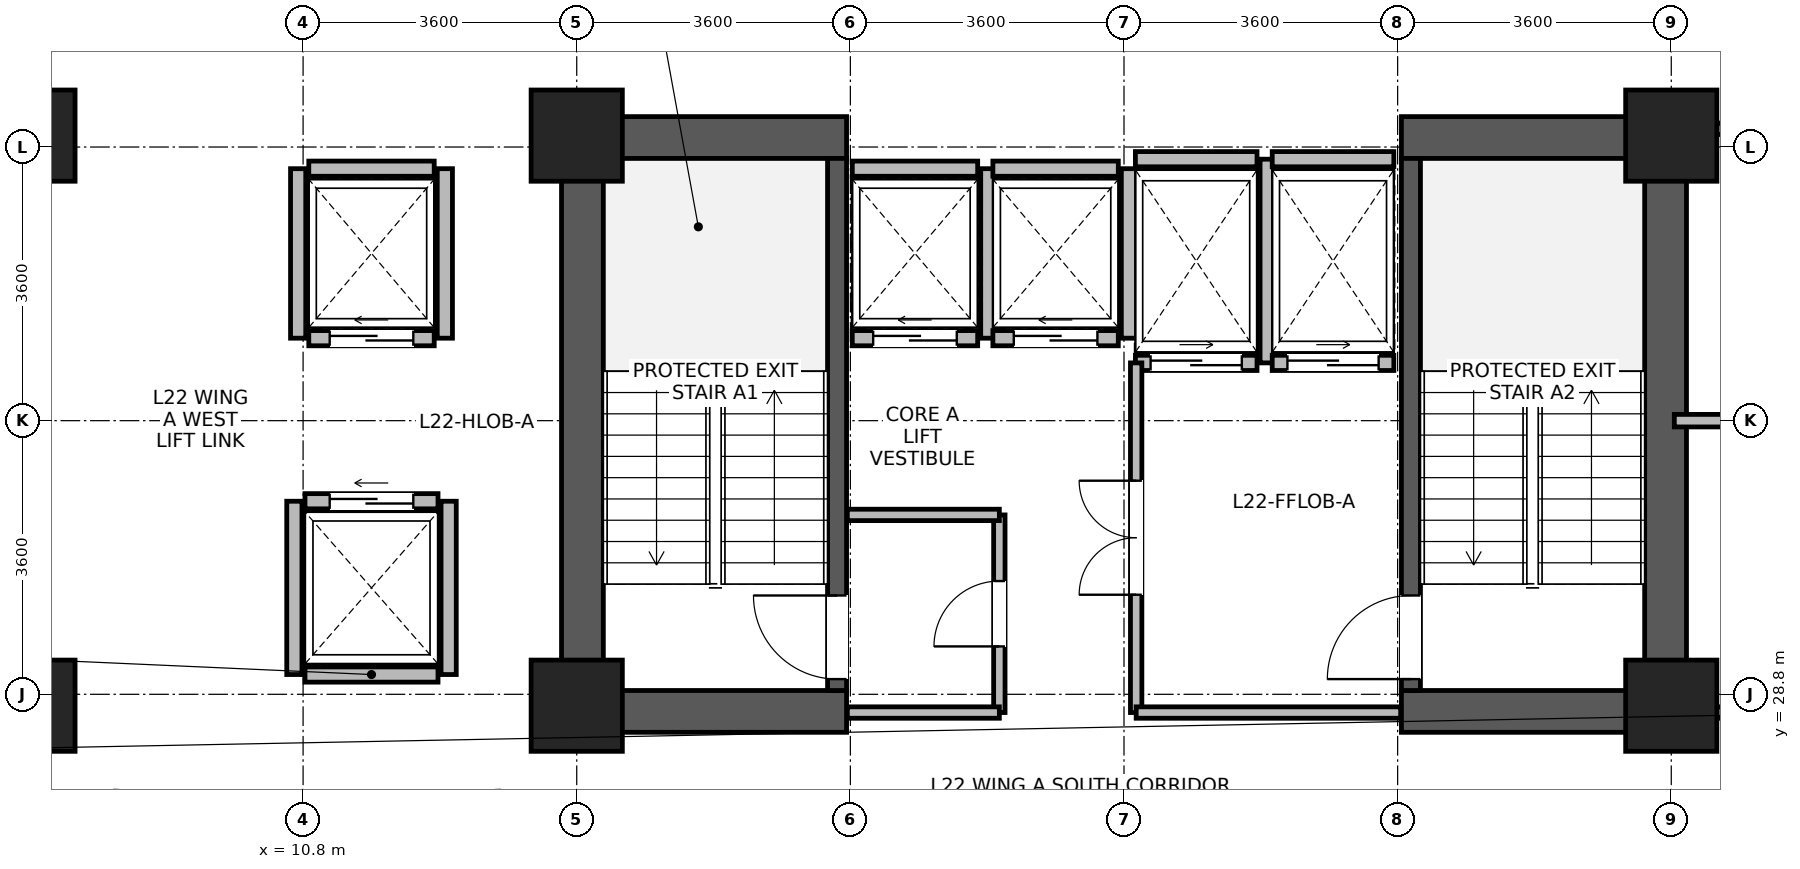
"""IFC4 building model, lengths in metres.
Left out: names, types, materials, properties, quantities, classifications, styles, units other than length and angle.
Written with IfcOpenShell. Run it as: python <this file> out.ifc"""

import sys

from ifc_helpers import new_model, si_unit, direction, frame, frame_2d, origin, origin_2d, place, context, subcontext, project, spatial, rectangle, extrude, source, transform, mapped, element, fill, save


model = new_model("IFC4")
c1 = context("Model", 3, precision=1e-05, world=origin(), true_north=direction((0.0, 1.0)))
c2 = subcontext(c1, "Body", "Model", "MODEL_VIEW")
j1 = project(units=[si_unit("LENGTHUNIT", "METRE"), si_unit("PLANEANGLEUNIT", "RADIAN")], contexts=[c1])
p1 = place(None, origin())
s1 = spatial("IfcSite", under=j1, at=p1, CompositionType="ELEMENT")
p2 = place(p1, origin())
s2 = spatial("IfcBuilding", under=s1, at=p2, CompositionType="ELEMENT")
p3 = place(p2, frame((0.0, 0.0, 89.7)))
s3 = spatial("IfcBuildingStorey", under=s2, at=p3, CompositionType="ELEMENT", Elevation=89.7)
for number, where, z_axis, x_axis in (
    (1, (14.475, 28.3, 0.0), (0.0, 0.0, 1.0), (0.0, 1.0, 0.0)),
    (2, (28.725, 28.3, 0.0), (0.0, 0.0, 1.0), (0.0, 1.0, 0.0)),
):
    element("IfcWall", number, at=place(p3, frame(where, z_axis=z_axis, x_axis=x_axis)), inside=s3, PredefinedType="SHEAR", context=c2, shape_type="SweptSolid", body=[
        extrude(rectangle(XDim=8.1, YDim=0.55, at=frame_2d((4.05, 0.0))), origin(), (0.0, 0.0, 1.0), 3.45),
    ])
for number, where, z_axis, x_axis in (
    (3, (14.75, 28.575, 0.0), (0.0, 0.0, 1.0), (1.0, 0.0, 0.0)),
    (4, (25.25, 28.575, 0.0), (0.0, 0.0, 1.0), (1.0, 0.0, 0.0)),
    (5, (14.75, 36.125, 0.0), (0.0, 0.0, 1.0), (1.0, 0.0, 0.0)),
    (6, (25.25, 36.125, 0.0), (0.0, 0.0, 1.0), (1.0, 0.0, 0.0)),
):
    element("IfcWall", number, at=place(p3, frame(where, z_axis=z_axis, x_axis=x_axis)), inside=s3, PredefinedType="SHEAR", context=c2, shape_type="SweptSolid", body=[
        extrude(rectangle(XDim=3.2, YDim=0.55, at=frame_2d((1.6, 0.0))), origin(), (0.0, 0.0, 1.0), 3.45),
    ])
p4 = place(p3, frame((17.825, 28.85, 0.0), z_axis=(0.0, 0.0, 1.0), x_axis=(0.0, 1.0, 0.0)))
e7 = element("IfcWall", 7, at=p4, inside=s3, PredefinedType="SHEAR", context=c2, shape_type="SweptSolid", body=[
    extrude(rectangle(XDim=7.0, YDim=0.25, at=frame_2d((3.5, 0.0))), origin(), (0.0, 0.0, 1.0), 3.45),
])
p5 = place(p4, frame((0.15, 0.0, 0.0)))
e8 = element("IfcOpeningElement", 8, at=p5, cuts=e7, PredefinedType="OPENING", context=c2, shape_type="SweptSolid", body=[
    extrude(rectangle(XDim=1.1, YDim=2.08, at=frame_2d((0.55, 1.04))), frame((0.0, 0.135, 0.0), z_axis=(0.0, -1.0, 0.0), x_axis=(1.0, 0.0, 0.0)), (0.0, 0.0, 1.0), 0.27),
])
p6 = place(p3, frame((25.375, 28.85, 0.0), z_axis=(0.0, 0.0, 1.0), x_axis=(0.0, 1.0, 0.0)))
e9 = element("IfcWall", 9, at=p6, inside=s3, PredefinedType="SHEAR", context=c2, shape_type="SweptSolid", body=[
    extrude(rectangle(XDim=7.0, YDim=0.25, at=frame_2d((3.5, 0.0))), origin(), (0.0, 0.0, 1.0), 3.45),
])
p7 = place(p6, frame((0.15, 0.0, 0.0)))
e10 = element("IfcOpeningElement", 10, at=p7, cuts=e9, PredefinedType="OPENING", context=c2, shape_type="SweptSolid", body=[
    extrude(rectangle(XDim=1.1, YDim=2.08, at=frame_2d((0.55, 1.04))), frame((0.0, 0.135, 0.0), z_axis=(0.0, -1.0, 0.0), x_axis=(1.0, 0.0, 0.0)), (0.0, 0.0, 1.0), 0.27),
])
m1 = source(origin(), c2, "Body", "SweptSolid", [
    extrude(rectangle(XDim=1.2, YDim=1.2, at=origin_2d()), origin(), (0.0, 0.0, 1.0), 3.7),
])
for number, where, z_axis, x_axis in (
    (11, (7.2, 28.65, 0.0), (0.0, 0.0, 1.0), (1.0, 0.0, 0.0)),
    (12, (7.2, 36.15, 0.0), (0.0, 0.0, 1.0), (1.0, 0.0, 0.0)),
    (13, (14.4, 28.65, 0.0), (0.0, 0.0, 1.0), (1.0, 0.0, 0.0)),
    (14, (14.4, 36.15, 0.0), (0.0, 0.0, 1.0), (1.0, 0.0, 0.0)),
    (15, (28.8, 28.65, 0.0), (0.0, 0.0, 1.0), (1.0, 0.0, 0.0)),
    (16, (28.8, 36.15, 0.0), (0.0, 0.0, 1.0), (1.0, 0.0, 0.0)),
):
    element("IfcColumn", number, at=place(p3, frame(where, z_axis=z_axis, x_axis=x_axis)), inside=s3, PredefinedType="COLUMN", context=c2, shape_type="MappedRepresentation", body=[
        mapped(m1, transform((0.0, 0.0, 0.0), x_axis=(1.0, 0.0, 0.0), y_axis=(0.0, 1.0, 0.0), z_axis=(0.0, 0.0, 1.0), scale=1.0)),
    ])
p8 = place(p3, frame((18.025, 33.485, 0.0), z_axis=(0.0, 0.0, 1.0), x_axis=(1.0, 0.0, 0.0)))
e17 = element("IfcWall", 17, at=p8, inside=s3, PredefinedType="PARTITIONING", context=c2, shape_type="SweptSolid", body=[
    extrude(rectangle(XDim=1.65, YDim=0.2, at=frame_2d((0.825, 0.0))), origin(), (0.0, 0.0, 1.0), 3.43),
])
p9 = place(p8, frame((0.275, 0.0, 0.0)))
e18 = element("IfcOpeningElement", 18, at=p9, cuts=e17, PredefinedType="OPENING", context=c2, shape_type="SweptSolid", body=[
    extrude(rectangle(XDim=1.1, YDim=2.12, at=frame_2d((0.55, 1.06))), frame((0.0, 0.11, 0.0), z_axis=(0.0, -1.0, 0.0), x_axis=(1.0, 0.0, 0.0)), (0.0, 0.0, 1.0), 0.22),
])
p10 = place(p3, frame((18.025, 35.715, 0.0), z_axis=(0.0, 0.0, 1.0), x_axis=(1.0, 0.0, 0.0)))
e19 = element("IfcWall", 19, at=p10, inside=s3, PredefinedType="PARTITIONING", context=c2, shape_type="SweptSolid", body=[
    extrude(rectangle(XDim=1.65, YDim=0.2, at=frame_2d((0.825, 0.0))), origin(), (0.0, 0.0, 1.0), 2.23),
])
p11 = place(p3, frame((19.815, 33.485, 0.0), z_axis=(0.0, 0.0, 1.0), x_axis=(0.0, 1.0, 0.0)))
e20 = element("IfcWall", 20, at=p11, inside=s3, PredefinedType="PARTITIONING", context=c2, shape_type="SweptSolid", body=[
    extrude(rectangle(XDim=2.23, YDim=0.2, at=frame_2d((1.115, 0.0))), origin(), (0.0, 0.0, 1.0), 3.43),
])
p12 = place(p3, frame((19.875, 33.485, 0.0), z_axis=(0.0, 0.0, 1.0), x_axis=(1.0, 0.0, 0.0)))
e21 = element("IfcWall", 21, at=p12, inside=s3, PredefinedType="PARTITIONING", context=c2, shape_type="SweptSolid", body=[
    extrude(rectangle(XDim=1.65, YDim=0.2, at=frame_2d((0.825, 0.0))), origin(), (0.0, 0.0, 1.0), 3.43),
])
p13 = place(p12, frame((0.275, 0.0, 0.0)))
e22 = element("IfcOpeningElement", 22, at=p13, cuts=e21, PredefinedType="OPENING", context=c2, shape_type="SweptSolid", body=[
    extrude(rectangle(XDim=1.1, YDim=2.12, at=frame_2d((0.55, 1.06))), frame((0.0, 0.11, 0.0), z_axis=(0.0, -1.0, 0.0), x_axis=(1.0, 0.0, 0.0)), (0.0, 0.0, 1.0), 0.22),
])
p14 = place(p3, frame((19.875, 35.715, 0.0), z_axis=(0.0, 0.0, 1.0), x_axis=(1.0, 0.0, 0.0)))
e23 = element("IfcWall", 23, at=p14, inside=s3, PredefinedType="PARTITIONING", context=c2, shape_type="SweptSolid", body=[
    extrude(rectangle(XDim=1.65, YDim=0.2, at=frame_2d((0.825, 0.0))), origin(), (0.0, 0.0, 1.0), 2.23),
])
p15 = place(p3, frame((21.665, 33.485, 0.0), z_axis=(0.0, 0.0, 1.0), x_axis=(0.0, 1.0, 0.0)))
e24 = element("IfcWall", 24, at=p15, inside=s3, PredefinedType="PARTITIONING", context=c2, shape_type="SweptSolid", body=[
    extrude(rectangle(XDim=2.23, YDim=0.2, at=frame_2d((1.115, 0.0))), origin(), (0.0, 0.0, 1.0), 3.43),
])
p16 = place(p3, frame((10.825, 29.06, 0.0), z_axis=(0.0, 0.0, 1.0), x_axis=(1.0, 0.0, 0.0)))
e25 = element("IfcWall", 25, at=p16, inside=s3, PredefinedType="PARTITIONING", context=c2, shape_type="SweptSolid", body=[
    extrude(rectangle(XDim=1.75, YDim=0.2, at=frame_2d((0.875, 0.0))), origin(), (0.0, 0.0, 1.0), 3.43),
])
p17 = place(p3, frame((10.825, 31.34, 0.0), z_axis=(0.0, 0.0, 1.0), x_axis=(1.0, 0.0, 0.0)))
e26 = element("IfcWall", 26, at=p17, inside=s3, PredefinedType="PARTITIONING", context=c2, shape_type="SweptSolid", body=[
    extrude(rectangle(XDim=1.75, YDim=0.2, at=frame_2d((0.875, 0.0))), origin(), (0.0, 0.0, 1.0), 3.43),
])
p18 = place(p17, frame((0.325, 0.0, 0.0)))
e27 = element("IfcOpeningElement", 27, at=p18, cuts=e26, PredefinedType="OPENING", context=c2, shape_type="SweptSolid", body=[
    extrude(rectangle(XDim=1.1, YDim=2.12, at=frame_2d((0.55, 1.06))), frame((0.0, 0.11, 0.0), z_axis=(0.0, -1.0, 0.0), x_axis=(1.0, 0.0, 0.0)), (0.0, 0.0, 1.0), 0.22),
])
for number, where, z_axis, x_axis in (
    (28, (10.685, 29.06, 0.0), (0.0, 0.0, 1.0), (0.0, 1.0, 0.0)),
    (29, (12.715, 29.06, 0.0), (0.0, 0.0, 1.0), (0.0, 1.0, 0.0)),
):
    element("IfcWall", number, at=place(p3, frame(where, z_axis=z_axis, x_axis=x_axis)), inside=s3, PredefinedType="PARTITIONING", context=c2, shape_type="SweptSolid", body=[
        extrude(rectangle(XDim=2.28, YDim=0.2, at=frame_2d((1.14, 0.0))), origin(), (0.0, 0.0, 1.0), 3.43),
    ])
p19 = place(p3, frame((10.875, 33.485, 0.0), z_axis=(0.0, 0.0, 1.0), x_axis=(1.0, 0.0, 0.0)))
e30 = element("IfcWall", 30, at=p19, inside=s3, PredefinedType="PARTITIONING", context=c2, shape_type="SweptSolid", body=[
    extrude(rectangle(XDim=1.65, YDim=0.2, at=frame_2d((0.825, 0.0))), origin(), (0.0, 0.0, 1.0), 3.43),
])
p20 = place(p19, frame((0.275, 0.0, 0.0)))
e31 = element("IfcOpeningElement", 31, at=p20, cuts=e30, PredefinedType="OPENING", context=c2, shape_type="SweptSolid", body=[
    extrude(rectangle(XDim=1.1, YDim=2.12, at=frame_2d((0.55, 1.06))), frame((0.0, 0.11, 0.0), z_axis=(0.0, -1.0, 0.0), x_axis=(1.0, 0.0, 0.0)), (0.0, 0.0, 1.0), 0.22),
])
p21 = place(p3, frame((10.875, 35.715, 0.0), z_axis=(0.0, 0.0, 1.0), x_axis=(1.0, 0.0, 0.0)))
e32 = element("IfcWall", 32, at=p21, inside=s3, PredefinedType="PARTITIONING", context=c2, shape_type="SweptSolid", body=[
    extrude(rectangle(XDim=1.65, YDim=0.2, at=frame_2d((0.825, 0.0))), origin(), (0.0, 0.0, 1.0), 3.43),
])
for number, where, z_axis, x_axis in (
    (33, (10.735, 33.485, 0.0), (0.0, 0.0, 1.0), (0.0, 1.0, 0.0)),
    (34, (12.665, 33.485, 0.0), (0.0, 0.0, 1.0), (0.0, 1.0, 0.0)),
):
    element("IfcWall", number, at=place(p3, frame(where, z_axis=z_axis, x_axis=x_axis)), inside=s3, PredefinedType="PARTITIONING", context=c2, shape_type="SweptSolid", body=[
        extrude(rectangle(XDim=2.23, YDim=0.2, at=frame_2d((1.115, 0.0))), origin(), (0.0, 0.0, 1.0), 3.43),
    ])
p22 = place(p3, frame((21.75, 33.16, 0.0), z_axis=(0.0, 0.0, 1.0), x_axis=(1.0, 0.0, 0.0)))
e35 = element("IfcWall", 35, at=p22, inside=s3, PredefinedType="PARTITIONING", context=c2, shape_type="SweptSolid", body=[
    extrude(rectangle(XDim=1.6, YDim=0.2, at=frame_2d((0.8, 0.0))), origin(), (0.0, 0.0, 1.0), 3.43),
])
p23 = place(p22, frame((0.2, 0.0, 0.0)))
e36 = element("IfcOpeningElement", 36, at=p23, cuts=e35, PredefinedType="OPENING", context=c2, shape_type="SweptSolid", body=[
    extrude(rectangle(XDim=1.2, YDim=2.12, at=frame_2d((0.6, 1.06))), frame((0.0, 0.11, 0.0), z_axis=(0.0, -1.0, 0.0), x_axis=(1.0, 0.0, 0.0)), (0.0, 0.0, 1.0), 0.22),
])
p24 = place(p3, frame((21.75, 35.84, 0.0), z_axis=(0.0, 0.0, 1.0), x_axis=(1.0, 0.0, 0.0)))
e37 = element("IfcWall", 37, at=p24, inside=s3, PredefinedType="PARTITIONING", context=c2, shape_type="SweptSolid", body=[
    extrude(rectangle(XDim=1.6, YDim=0.2, at=frame_2d((0.8, 0.0))), origin(), (0.0, 0.0, 1.0), 2.23),
])
p25 = place(p3, frame((23.49, 33.16, 0.0), z_axis=(0.0, 0.0, 1.0), x_axis=(0.0, 1.0, 0.0)))
e38 = element("IfcWall", 38, at=p25, inside=s3, PredefinedType="PARTITIONING", context=c2, shape_type="SweptSolid", body=[
    extrude(rectangle(XDim=2.68, YDim=0.2, at=frame_2d((1.34, 0.0))), origin(), (0.0, 0.0, 1.0), 3.43),
])
p26 = place(p3, frame((23.55, 33.16, 0.0), z_axis=(0.0, 0.0, 1.0), x_axis=(1.0, 0.0, 0.0)))
e39 = element("IfcWall", 39, at=p26, inside=s3, PredefinedType="PARTITIONING", context=c2, shape_type="SweptSolid", body=[
    extrude(rectangle(XDim=1.6, YDim=0.2, at=frame_2d((0.8, 0.0))), origin(), (0.0, 0.0, 1.0), 3.43),
])
p27 = place(p26, frame((0.2, 0.0, 0.0)))
e40 = element("IfcOpeningElement", 40, at=p27, cuts=e39, PredefinedType="OPENING", context=c2, shape_type="SweptSolid", body=[
    extrude(rectangle(XDim=1.2, YDim=2.12, at=frame_2d((0.6, 1.06))), frame((0.0, 0.11, 0.0), z_axis=(0.0, -1.0, 0.0), x_axis=(1.0, 0.0, 0.0)), (0.0, 0.0, 1.0), 0.22),
])
p28 = place(p3, frame((23.55, 35.84, 0.0), z_axis=(0.0, 0.0, 1.0), x_axis=(1.0, 0.0, 0.0)))
e41 = element("IfcWall", 41, at=p28, inside=s3, PredefinedType="PARTITIONING", context=c2, shape_type="SweptSolid", body=[
    extrude(rectangle(XDim=1.6, YDim=0.2, at=frame_2d((0.8, 0.0))), origin(), (0.0, 0.0, 1.0), 2.23),
])
p29 = place(p3, frame((29.4, 28.56, 0.0), z_axis=(0.0, 0.0, 1.0), x_axis=(1.0, 0.0, 0.0)))
e42 = element("IfcWall", 42, at=p29, inside=s3, PredefinedType="PARTITIONING", context=c2, shape_type="SweptSolid", body=[
    extrude(rectangle(XDim=3.96, YDim=0.15, at=frame_2d((1.98, 0.0))), origin(), (0.0, 0.0, 1.0), 2.78),
])
p30 = place(p29, frame((1.55, 0.0, 0.0)))
e43 = element("IfcOpeningElement", 43, at=p30, cuts=e42, PredefinedType="OPENING", context=c2, shape_type="SweptSolid", body=[
    extrude(rectangle(XDim=0.86, YDim=2.02, at=frame_2d((0.43, 1.01))), frame((0.0, 0.085, 0.0), z_axis=(0.0, -1.0, 0.0), x_axis=(1.0, 0.0, 0.0)), (0.0, 0.0, 1.0), 0.17),
])
p31 = place(p3, frame((29.4, 36.24, 0.0), z_axis=(0.0, 0.0, 1.0), x_axis=(1.0, 0.0, 0.0)))
e44 = element("IfcWall", 44, at=p31, inside=s3, PredefinedType="PARTITIONING", context=c2, shape_type="SweptSolid", body=[
    extrude(rectangle(XDim=3.96, YDim=0.15, at=frame_2d((1.98, 0.0))), origin(), (0.0, 0.0, 1.0), 2.78),
])
p32 = place(p31, frame((1.33, 0.0, 0.0)))
e45 = element("IfcOpeningElement", 45, at=p32, cuts=e44, PredefinedType="OPENING", context=c2, shape_type="SweptSolid", body=[
    extrude(rectangle(XDim=1.3, YDim=2.12, at=frame_2d((0.65, 1.06))), frame((0.0, 0.085, 0.0), z_axis=(0.0, -1.0, 0.0), x_axis=(1.0, 0.0, 0.0)), (0.0, 0.0, 1.0), 0.17),
])
p33 = place(p3, frame((19.96, 28.56, 0.0), z_axis=(0.0, 0.0, 1.0), x_axis=(0.0, 1.0, 0.0)))
e46 = element("IfcWall", 46, at=p33, inside=s3, PredefinedType="PARTITIONING", context=c2, shape_type="SweptSolid", body=[
    extrude(rectangle(XDim=2.6, YDim=0.15, at=frame_2d((1.3, 0.0))), origin(), (0.0, 0.0, 1.0), 3.43),
])
p34 = place(p33, frame((0.87, 0.0, 0.0)))
e47 = element("IfcOpeningElement", 47, at=p34, cuts=e46, PredefinedType="OPENING", context=c2, shape_type="SweptSolid", body=[
    extrude(rectangle(XDim=0.86, YDim=2.02, at=frame_2d((0.43, 1.01))), frame((0.0, 0.085, 0.0), z_axis=(0.0, -1.0, 0.0), x_axis=(1.0, 0.0, 0.0)), (0.0, 0.0, 1.0), 0.17),
])
p35 = place(p3, frame((17.96, 28.56, 0.0), z_axis=(0.0, 0.0, 1.0), x_axis=(1.0, 0.0, 0.0)))
e48 = element("IfcWall", 48, at=p35, inside=s3, PredefinedType="PARTITIONING", context=c2, shape_type="SweptSolid", body=[
    extrude(rectangle(XDim=2.0, YDim=0.15, at=frame_2d((1.0, 0.0))), origin(), (0.0, 0.0, 1.0), 2.23),
])
p36 = place(p3, frame((17.96, 31.16, 0.0), z_axis=(0.0, 0.0, 1.0), x_axis=(1.0, 0.0, 0.0)))
e49 = element("IfcWall", 49, at=p36, inside=s3, PredefinedType="PARTITIONING", context=c2, shape_type="SweptSolid", body=[
    extrude(rectangle(XDim=2.0, YDim=0.15, at=frame_2d((1.0, 0.0))), origin(), (0.0, 0.0, 1.0), 3.43),
])
p37 = place(p3, frame((21.76, 28.56, 0.0), z_axis=(0.0, 0.0, 1.0), x_axis=(0.0, 1.0, 0.0)))
e50 = element("IfcWall", 50, at=p37, inside=s3, PredefinedType="PARTITIONING", context=c2, shape_type="SweptSolid", body=[
    extrude(rectangle(XDim=4.6, YDim=0.15, at=frame_2d((2.3, 0.0))), origin(), (0.0, 0.0, 1.0), 3.43),
])
p38 = place(p37, frame((1.55, 0.0, 0.0)))
e51 = element("IfcOpeningElement", 51, at=p38, cuts=e50, PredefinedType="OPENING", context=c2, shape_type="SweptSolid", body=[
    extrude(rectangle(XDim=1.5, YDim=2.1, at=frame_2d((0.75, 1.05))), frame((0.0, 0.085, 0.0), z_axis=(0.0, -1.0, 0.0), x_axis=(1.0, 0.0, 0.0)), (0.0, 0.0, 1.0), 0.17),
])
p39 = place(p3, frame((28.84, 32.4, 0.0), z_axis=(0.0, 0.0, 1.0), x_axis=(1.0, 0.0, 0.0)))
e52 = element("IfcWall", 52, at=p39, inside=s3, PredefinedType="PARTITIONING", context=c2, shape_type="SweptSolid", body=[
    extrude(rectangle(XDim=4.52, YDim=0.165, at=frame_2d((2.26, 0.0))), origin(), (0.0, 0.0, 1.0), 3.43),
])
p40 = place(p3, frame((21.76, 28.56, 0.0), z_axis=(0.0, 0.0, 1.0), x_axis=(1.0, 0.0, 0.0)))
e53 = element("IfcWall", 53, at=p40, inside=s3, PredefinedType="PARTITIONING", context=c2, shape_type="SweptSolid", body=[
    extrude(rectangle(XDim=3.48, YDim=0.15, at=frame_2d((1.74, 0.0))), origin(), (0.0, 0.0, 1.0), 2.23),
])
p41 = place(p5, origin())
e54 = element("IfcDoor", 54, at=p41, inside=s3, OperationType="SINGLE_SWING_RIGHT", PredefinedType="DOOR", context=c2, shape_type="SweptSolid", body=[
    extrude(rectangle(XDim=1.1, YDim=2.08, at=frame_2d((0.55, 1.04))), frame((0.0, 0.025, 0.0), z_axis=(0.0, -1.0, 0.0), x_axis=(1.0, 0.0, 0.0)), (0.0, 0.0, 1.0), 0.05),
])
fill(e8, e54)
p42 = place(p7, origin())
e55 = element("IfcDoor", 55, at=p42, inside=s3, OperationType="SINGLE_SWING_LEFT", PredefinedType="DOOR", context=c2, shape_type="SweptSolid", body=[
    extrude(rectangle(XDim=1.1, YDim=2.08, at=frame_2d((0.55, 1.04))), frame((0.0, 0.025, 0.0), z_axis=(0.0, -1.0, 0.0), x_axis=(1.0, 0.0, 0.0)), (0.0, 0.0, 1.0), 0.05),
])
fill(e10, e55)
p43 = place(p9, origin())
e56 = element("IfcDoor", 56, at=p43, inside=s3, OperationType="SLIDING_TO_LEFT", PredefinedType="DOOR", context=c2, shape_type="SweptSolid", body=[
    extrude(rectangle(XDim=1.1, YDim=2.12, at=frame_2d((0.55, 1.06))), frame((0.0, 0.025, 0.0), z_axis=(0.0, -1.0, 0.0), x_axis=(1.0, 0.0, 0.0)), (0.0, 0.0, 1.0), 0.05),
])
fill(e18, e56)
p44 = place(p13, origin())
e57 = element("IfcDoor", 57, at=p44, inside=s3, OperationType="SLIDING_TO_LEFT", PredefinedType="DOOR", context=c2, shape_type="SweptSolid", body=[
    extrude(rectangle(XDim=1.1, YDim=2.12, at=frame_2d((0.55, 1.06))), frame((0.0, 0.025, 0.0), z_axis=(0.0, -1.0, 0.0), x_axis=(1.0, 0.0, 0.0)), (0.0, 0.0, 1.0), 0.05),
])
fill(e22, e57)
p45 = place(p18, origin())
e58 = element("IfcDoor", 58, at=p45, inside=s3, OperationType="SLIDING_TO_LEFT", PredefinedType="DOOR", context=c2, shape_type="SweptSolid", body=[
    extrude(rectangle(XDim=1.1, YDim=2.12, at=frame_2d((0.55, 1.06))), frame((0.0, 0.025, 0.0), z_axis=(0.0, -1.0, 0.0), x_axis=(1.0, 0.0, 0.0)), (0.0, 0.0, 1.0), 0.05),
])
fill(e27, e58)
p46 = place(p20, origin())
e59 = element("IfcDoor", 59, at=p46, inside=s3, OperationType="SLIDING_TO_LEFT", PredefinedType="DOOR", context=c2, shape_type="SweptSolid", body=[
    extrude(rectangle(XDim=1.1, YDim=2.12, at=frame_2d((0.55, 1.06))), frame((0.0, 0.025, 0.0), z_axis=(0.0, -1.0, 0.0), x_axis=(1.0, 0.0, 0.0)), (0.0, 0.0, 1.0), 0.05),
])
fill(e31, e59)
p47 = place(p23, origin())
e60 = element("IfcDoor", 60, at=p47, inside=s3, OperationType="SLIDING_TO_RIGHT", PredefinedType="DOOR", context=c2, shape_type="SweptSolid", body=[
    extrude(rectangle(XDim=1.2, YDim=2.12, at=frame_2d((0.6, 1.06))), frame((0.0, 0.025, 0.0), z_axis=(0.0, -1.0, 0.0), x_axis=(1.0, 0.0, 0.0)), (0.0, 0.0, 1.0), 0.05),
])
fill(e36, e60)
p48 = place(p27, origin())
e61 = element("IfcDoor", 61, at=p48, inside=s3, OperationType="SLIDING_TO_RIGHT", PredefinedType="DOOR", context=c2, shape_type="SweptSolid", body=[
    extrude(rectangle(XDim=1.2, YDim=2.12, at=frame_2d((0.6, 1.06))), frame((0.0, 0.025, 0.0), z_axis=(0.0, -1.0, 0.0), x_axis=(1.0, 0.0, 0.0)), (0.0, 0.0, 1.0), 0.05),
])
fill(e40, e61)
p49 = place(p34, origin())
e62 = element("IfcDoor", 62, at=p49, inside=s3, OperationType="SINGLE_SWING_LEFT", PredefinedType="DOOR", context=c2, shape_type="SweptSolid", body=[
    extrude(rectangle(XDim=0.86, YDim=2.02, at=frame_2d((0.43, 1.01))), frame((0.0, 0.025, 0.0), z_axis=(0.0, -1.0, 0.0), x_axis=(1.0, 0.0, 0.0)), (0.0, 0.0, 1.0), 0.05),
])
fill(e47, e62)
p50 = place(p38, origin())
e63 = element("IfcDoor", 63, at=p50, inside=s3, OperationType="DOUBLE_DOOR_SINGLE_SWING", PredefinedType="DOOR", context=c2, shape_type="SweptSolid", body=[
    extrude(rectangle(XDim=1.5, YDim=2.1, at=frame_2d((0.75, 1.05))), frame((0.0, 0.025, 0.0), z_axis=(0.0, -1.0, 0.0), x_axis=(1.0, 0.0, 0.0)), (0.0, 0.0, 1.0), 0.05),
])
fill(e51, e63)
save(model, sys.argv[1])
